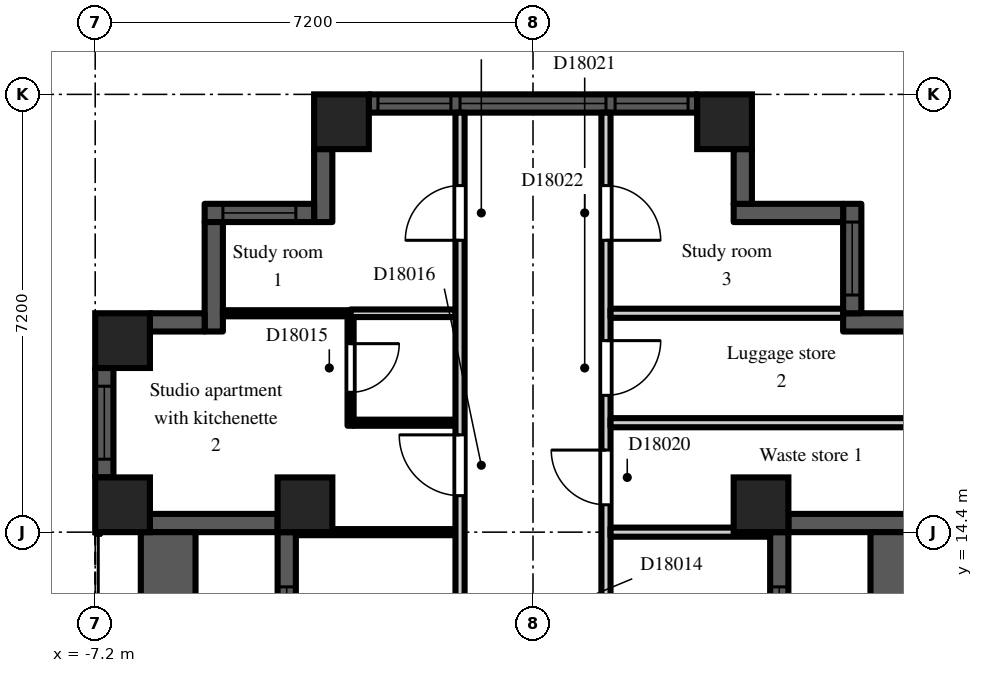
"""IFC4 building model, lengths in metres.
Left out: names, types, materials, properties, quantities, classifications, styles, units other than length and angle.
Written with IfcOpenShell. Run it as: python <this file> out.ifc"""

import sys

from ifc_helpers import new_model, si_unit, direction, frame, frame_2d, origin, origin_2d, place, context, subcontext, project, spatial, rectangle, extrude, element, fill, save


model = new_model("IFC4")
c1 = context("Model", 3, precision=1e-05, world=origin(), true_north=direction((0.0, 1.0)))
c2 = subcontext(c1, "Body", "Model", "MODEL_VIEW")
j1 = project(units=[si_unit("LENGTHUNIT", "METRE"), si_unit("PLANEANGLEUNIT", "RADIAN")], contexts=[c1])
p1 = place(None, origin())
s1 = spatial("IfcSite", under=j1, at=p1, CompositionType="ELEMENT")
p2 = place(p1, origin())
s2 = spatial("IfcBuilding", under=s1, at=p2, CompositionType="ELEMENT")
p3 = place(p2, frame((0.0, 0.0, 120.3)))
s3 = spatial("IfcBuildingStorey", under=s2, at=p3, CompositionType="ELEMENT", Elevation=120.3)
for number, where, z_axis, x_axis in (
    (1, (-6.75, 14.85, 0.0), (0.0, 0.0, 1.0), (1.0, 0.0, 0.0)),
    (2, (-6.75, 17.55, 0.0), (0.0, 0.0, 1.0), (1.0, 0.0, 0.0)),
    (3, (-3.75, 14.85, 0.0), (0.0, 0.0, 1.0), (1.0, 0.0, 0.0)),
    (4, (-3.15, 21.15, 0.0), (0.0, 0.0, 1.0), (1.0, 0.0, 0.0)),
    (5, (3.15, 21.15, 0.0), (0.0, 0.0, 1.0), (1.0, 0.0, 0.0)),
    (6, (3.75, 14.85, 0.0), (0.0, 0.0, 1.0), (1.0, 0.0, 0.0)),
):
    element("IfcColumn", number, at=place(p3, frame(where, z_axis=z_axis, x_axis=x_axis)), inside=s3, PredefinedType="COLUMN", context=c2, shape_type="SweptSolid", body=[
        extrude(rectangle(XDim=0.9, YDim=0.9, at=origin_2d()), origin(), (0.0, 0.0, 1.0), 3.0),
    ])
p4 = place(p3, frame((4.05, 7.2, 0.0), z_axis=(0.0, 0.0, 1.0), x_axis=(0.0, 1.0, 0.0)))
e7 = element("IfcWall", 7, at=p4, inside=s3, PredefinedType="SOLIDWALL", context=c2, shape_type="SweptSolid", body=[
    extrude(rectangle(XDim=7.2, YDim=0.3, at=frame_2d((3.6, 0.0))), origin(), (0.0, 0.0, 1.0), 2.2),
])
p5 = place(p4, frame((3.0, 0.0, 0.0)))
e8 = element("IfcOpeningElement", 8, at=p5, cuts=e7, PredefinedType="OPENING", context=c2, shape_type="SweptSolid", body=[
    extrude(rectangle(XDim=1.2, YDim=2.05, at=frame_2d((0.6, 1.025))), frame((0.0, 0.16, 0.0), z_axis=(0.0, -1.0, 0.0), x_axis=(1.0, 0.0, 0.0)), (0.0, 0.0, 1.0), 0.32),
])
p6 = place(p4, frame((0.9, 0.0, 0.2)))
e9 = element("IfcOpeningElement", 9, at=p6, cuts=e7, PredefinedType="OPENING", context=c2, shape_type="SweptSolid", body=[
    extrude(rectangle(XDim=1.8, YDim=1.85, at=frame_2d((0.9, 0.925))), frame((0.0, 0.16, 0.0), z_axis=(0.0, -1.0, 0.0), x_axis=(1.0, 0.0, 0.0)), (0.0, 0.0, 1.0), 0.32),
])
p7 = place(p4, frame((4.5, 0.0, 0.2)))
e10 = element("IfcOpeningElement", 10, at=p7, cuts=e7, PredefinedType="OPENING", context=c2, shape_type="SweptSolid", body=[
    extrude(rectangle(XDim=1.8, YDim=1.85, at=frame_2d((0.9, 0.925))), frame((0.0, 0.16, 0.0), z_axis=(0.0, -1.0, 0.0), x_axis=(1.0, 0.0, 0.0)), (0.0, 0.0, 1.0), 0.32),
])
p8 = place(p3, frame((4.2, 14.55, 0.0), z_axis=(0.0, 0.0, 1.0), x_axis=(1.0, 0.0, 0.0)))
e11 = element("IfcWall", 11, at=p8, inside=s3, PredefinedType="SOLIDWALL", context=c2, shape_type="SweptSolid", body=[
    extrude(rectangle(XDim=2.1, YDim=0.3, at=frame_2d((1.05, 0.0))), origin(), (0.0, 0.0, 1.0), 2.2),
])
p9 = place(p3, frame((6.3, 17.85, 0.0), z_axis=(0.0, 0.0, 1.0), x_axis=(-1.0, 0.0, 0.0)))
e12 = element("IfcWall", 12, at=p9, inside=s3, PredefinedType="SOLIDWALL", context=c2, shape_type="SweptSolid", body=[
    extrude(rectangle(XDim=1.2, YDim=0.3, at=frame_2d((0.6, 0.0))), origin(), (0.0, 0.0, 1.0), 2.6),
])
p10 = place(p3, frame((5.25, 18.0, 0.0), z_axis=(0.0, 0.0, 1.0), x_axis=(0.0, 1.0, 0.0)))
e13 = element("IfcWall", 13, at=p10, inside=s3, PredefinedType="SOLIDWALL", context=c2, shape_type="SweptSolid", body=[
    extrude(rectangle(XDim=1.8, YDim=0.3, at=frame_2d((0.9, 0.0))), origin(), (0.0, 0.0, 1.0), 2.6),
])
p11 = place(p10, frame((0.3, 0.0, 0.2)))
e14 = element("IfcOpeningElement", 14, at=p11, cuts=e13, PredefinedType="OPENING", context=c2, shape_type="SweptSolid", body=[
    extrude(rectangle(XDim=1.2, YDim=1.85, at=frame_2d((0.6, 0.925))), frame((0.0, 0.16, 0.0), z_axis=(0.0, -1.0, 0.0), x_axis=(1.0, 0.0, 0.0)), (0.0, 0.0, 1.0), 0.32),
])
p12 = place(p3, frame((5.1, 19.65, 0.0), z_axis=(0.0, 0.0, 1.0), x_axis=(-1.0, 0.0, 0.0)))
e15 = element("IfcWall", 15, at=p12, inside=s3, PredefinedType="SOLIDWALL", context=c2, shape_type="SweptSolid", body=[
    extrude(rectangle(XDim=1.8, YDim=0.3, at=frame_2d((0.9, 0.0))), origin(), (0.0, 0.0, 1.0), 2.6),
])
p13 = place(p3, frame((3.45, 19.8, 0.0), z_axis=(0.0, 0.0, 1.0), x_axis=(0.0, 1.0, 0.0)))
e16 = element("IfcWall", 16, at=p13, inside=s3, PredefinedType="SOLIDWALL", context=c2, shape_type="SweptSolid", body=[
    extrude(rectangle(XDim=0.9, YDim=0.3, at=frame_2d((0.45, 0.0))), origin(), (0.0, 0.0, 1.0), 2.6),
])
p14 = place(p3, frame((2.7, 21.45, 0.0), z_axis=(0.0, 0.0, 1.0), x_axis=(-1.0, 0.0, 0.0)))
e17 = element("IfcWall", 17, at=p14, inside=s3, PredefinedType="SOLIDWALL", context=c2, shape_type="SweptSolid", body=[
    extrude(rectangle(XDim=5.4, YDim=0.3, at=frame_2d((2.7, 0.0))), origin(), (0.0, 0.0, 1.0), 2.2),
])
p15 = place(p14, frame((1.5, 0.0, 0.2)))
e18 = element("IfcOpeningElement", 18, at=p15, cuts=e17, PredefinedType="OPENING", context=c2, shape_type="SweptSolid", body=[
    extrude(rectangle(XDim=2.4, YDim=1.85, at=frame_2d((1.2, 0.925))), frame((0.0, 0.16, 0.0), z_axis=(0.0, -1.0, 0.0), x_axis=(1.0, 0.0, 0.0)), (0.0, 0.0, 1.0), 0.32),
])
p16 = place(p14, frame((0.15, 0.0, 0.2)))
e19 = element("IfcOpeningElement", 19, at=p16, cuts=e17, PredefinedType="OPENING", context=c2, shape_type="SweptSolid", body=[
    extrude(rectangle(XDim=1.2, YDim=1.85, at=frame_2d((0.6, 0.925))), frame((0.0, 0.16, 0.0), z_axis=(0.0, -1.0, 0.0), x_axis=(1.0, 0.0, 0.0)), (0.0, 0.0, 1.0), 0.32),
])
p17 = place(p14, frame((4.05, 0.0, 0.2)))
e20 = element("IfcOpeningElement", 20, at=p17, cuts=e17, PredefinedType="OPENING", context=c2, shape_type="SweptSolid", body=[
    extrude(rectangle(XDim=1.2, YDim=1.85, at=frame_2d((0.6, 0.925))), frame((0.0, 0.16, 0.0), z_axis=(0.0, -1.0, 0.0), x_axis=(1.0, 0.0, 0.0)), (0.0, 0.0, 1.0), 0.32),
])
p18 = place(p3, frame((-3.45, 20.7, 0.0), z_axis=(0.0, 0.0, 1.0), x_axis=(0.0, -1.0, 0.0)))
e21 = element("IfcWall", 21, at=p18, inside=s3, PredefinedType="SOLIDWALL", context=c2, shape_type="SweptSolid", body=[
    extrude(rectangle(XDim=1.2, YDim=0.3, at=frame_2d((0.6, 0.0))), origin(), (0.0, 0.0, 1.0), 2.6),
])
p19 = place(p3, frame((-3.6, 19.65, 0.0), z_axis=(0.0, 0.0, 1.0), x_axis=(-1.0, 0.0, 0.0)))
e22 = element("IfcWall", 22, at=p19, inside=s3, PredefinedType="SOLIDWALL", context=c2, shape_type="SweptSolid", body=[
    extrude(rectangle(XDim=1.8, YDim=0.3, at=frame_2d((0.9, 0.0))), origin(), (0.0, 0.0, 1.0), 2.6),
])
p20 = place(p19, frame((0.3, 0.0, 0.2)))
e23 = element("IfcOpeningElement", 23, at=p20, cuts=e22, PredefinedType="OPENING", context=c2, shape_type="SweptSolid", body=[
    extrude(rectangle(XDim=1.2, YDim=1.85, at=frame_2d((0.6, 0.925))), frame((0.0, 0.16, 0.0), z_axis=(0.0, -1.0, 0.0), x_axis=(1.0, 0.0, 0.0)), (0.0, 0.0, 1.0), 0.32),
])
p21 = place(p3, frame((-5.25, 19.5, 0.0), z_axis=(0.0, 0.0, 1.0), x_axis=(0.0, -1.0, 0.0)))
e24 = element("IfcWall", 24, at=p21, inside=s3, PredefinedType="SOLIDWALL", context=c2, shape_type="SweptSolid", body=[
    extrude(rectangle(XDim=1.8, YDim=0.3, at=frame_2d((0.9, 0.0))), origin(), (0.0, 0.0, 1.0), 2.6),
])
p22 = place(p3, frame((-5.4, 17.85, 0.0), z_axis=(0.0, 0.0, 1.0), x_axis=(-1.0, 0.0, 0.0)))
e25 = element("IfcWall", 25, at=p22, inside=s3, PredefinedType="SOLIDWALL", context=c2, shape_type="SweptSolid", body=[
    extrude(rectangle(XDim=0.9, YDim=0.3, at=frame_2d((0.45, 0.0))), origin(), (0.0, 0.0, 1.0), 2.6),
])
p23 = place(p3, frame((-7.05, 17.1, 0.0), z_axis=(0.0, 0.0, 1.0), x_axis=(0.0, -1.0, 0.0)))
e26 = element("IfcWall", 26, at=p23, inside=s3, PredefinedType="SOLIDWALL", context=c2, shape_type="SweptSolid", body=[
    extrude(rectangle(XDim=1.8, YDim=0.3, at=frame_2d((0.9, 0.0))), origin(), (0.0, 0.0, 1.0), 2.2),
])
p24 = place(p23, frame((0.3, 0.0, 0.2)))
e27 = element("IfcOpeningElement", 27, at=p24, cuts=e26, PredefinedType="OPENING", context=c2, shape_type="SweptSolid", body=[
    extrude(rectangle(XDim=1.2, YDim=1.85, at=frame_2d((0.6, 0.925))), frame((0.0, 0.16, 0.0), z_axis=(0.0, -1.0, 0.0), x_axis=(1.0, 0.0, 0.0)), (0.0, 0.0, 1.0), 0.32),
])
p25 = place(p3, frame((-6.3, 14.55, 0.0), z_axis=(0.0, 0.0, 1.0), x_axis=(1.0, 0.0, 0.0)))
e28 = element("IfcWall", 28, at=p25, inside=s3, PredefinedType="SOLIDWALL", context=c2, shape_type="SweptSolid", body=[
    extrude(rectangle(XDim=2.1, YDim=0.3, at=frame_2d((1.05, 0.0))), origin(), (0.0, 0.0, 1.0), 2.2),
])
p26 = place(p3, frame((-4.05, 14.4, 0.0), z_axis=(0.0, 0.0, 1.0), x_axis=(0.0, -1.0, 0.0)))
e29 = element("IfcWall", 29, at=p26, inside=s3, PredefinedType="SOLIDWALL", context=c2, shape_type="SweptSolid", body=[
    extrude(rectangle(XDim=7.2, YDim=0.3, at=frame_2d((3.6, 0.0))), origin(), (0.0, 0.0, 1.0), 2.2),
])
p27 = place(p26, frame((3.0, 0.0, 0.0)))
e30 = element("IfcOpeningElement", 30, at=p27, cuts=e29, PredefinedType="OPENING", context=c2, shape_type="SweptSolid", body=[
    extrude(rectangle(XDim=1.2, YDim=2.05, at=frame_2d((0.6, 1.025))), frame((0.0, 0.16, 0.0), z_axis=(0.0, -1.0, 0.0), x_axis=(1.0, 0.0, 0.0)), (0.0, 0.0, 1.0), 0.32),
])
p28 = place(p26, frame((0.9, 0.0, 0.2)))
e31 = element("IfcOpeningElement", 31, at=p28, cuts=e29, PredefinedType="OPENING", context=c2, shape_type="SweptSolid", body=[
    extrude(rectangle(XDim=1.8, YDim=1.85, at=frame_2d((0.9, 0.925))), frame((0.0, 0.16, 0.0), z_axis=(0.0, -1.0, 0.0), x_axis=(1.0, 0.0, 0.0)), (0.0, 0.0, 1.0), 0.32),
])
p29 = place(p26, frame((4.5, 0.0, 0.2)))
e32 = element("IfcOpeningElement", 32, at=p29, cuts=e29, PredefinedType="OPENING", context=c2, shape_type="SweptSolid", body=[
    extrude(rectangle(XDim=1.8, YDim=1.85, at=frame_2d((0.9, 0.925))), frame((0.0, 0.16, 0.0), z_axis=(0.0, -1.0, 0.0), x_axis=(1.0, 0.0, 0.0)), (0.0, 0.0, 1.0), 0.32),
])
for number, where, z_axis, x_axis in (
    (33, (6.0, 7.2, 0.0), (0.0, 0.0, 1.0), (0.0, 1.0, 0.0)),
    (34, (-6.0, 7.2, 0.0), (0.0, 0.0, 1.0), (0.0, 1.0, 0.0)),
):
    element("IfcWall", number, at=place(p3, frame(where, z_axis=z_axis, x_axis=x_axis)), inside=s3, PredefinedType="PARAPET", context=c2, shape_type="SweptSolid", body=[
        extrude(rectangle(XDim=7.2, YDim=0.9, at=frame_2d((3.6, 0.0))), origin(), (0.0, 0.0, 1.0), 0.8),
    ])
p30 = place(p3, frame((-5.1, 18.0, 0.0), z_axis=(0.0, 0.0, 1.0), x_axis=(1.0, 0.0, 0.0)))
e35 = element("IfcWall", 35, at=p30, inside=s3, PredefinedType="PARTITIONING", context=c2, shape_type="SweptSolid", body=[
    extrude(rectangle(XDim=2.1, YDim=0.1, at=frame_2d((1.05, 0.0))), origin(), (0.0, 0.0, 1.0), 2.6),
])
p31 = place(p3, frame((-3.9, 14.4, 0.0), z_axis=(0.0, 0.0, 1.0), x_axis=(1.0, 0.0, 0.0)))
e36 = element("IfcWall", 36, at=p31, inside=s3, PredefinedType="PARTITIONING", context=c2, shape_type="SweptSolid", body=[
    extrude(rectangle(XDim=2.625, YDim=0.1, at=frame_2d((1.312, 0.0))), origin(), (0.0, 0.0, 1.0), 2.6),
])
p32 = place(p3, frame((-3.0, 16.15, 0.0), z_axis=(0.0, 0.0, 1.0), x_axis=(0.0, 1.0, 0.0)))
e37 = element("IfcWall", 37, at=p32, inside=s3, PredefinedType="PARTITIONING", context=c2, shape_type="SweptSolid", body=[
    extrude(rectangle(XDim=1.788, YDim=0.1, at=frame_2d((0.894, 0.0))), origin(), (0.0, 0.0, 1.0), 2.6),
])
p33 = place(p32, frame((0.55, 0.0, 0.0)))
e38 = element("IfcOpeningElement", 38, at=p33, cuts=e37, PredefinedType="OPENING", context=c2, shape_type="SweptSolid", body=[
    extrude(rectangle(XDim=0.8, YDim=2.1, at=frame_2d((0.4, 1.05))), frame((0.0, 0.06, 0.0), z_axis=(0.0, -1.0, 0.0), x_axis=(1.0, 0.0, 0.0)), (0.0, 0.0, 1.0), 0.12),
])
p34 = place(p3, frame((-2.95, 16.2, 0.0), z_axis=(0.0, 0.0, 1.0), x_axis=(1.0, 0.0, 0.0)))
e39 = element("IfcWall", 39, at=p34, inside=s3, PredefinedType="PARTITIONING", context=c2, shape_type="SweptSolid", body=[
    extrude(rectangle(XDim=1.675, YDim=0.1, at=frame_2d((0.837, 0.0))), origin(), (0.0, 0.0, 1.0), 2.6),
])
p35 = place(p3, frame((-3.0, 18.0, 0.0), z_axis=(0.0, 0.0, 1.0), x_axis=(1.0, 0.0, 0.0)))
e40 = element("IfcWall", 40, at=p35, inside=s3, PredefinedType="PARTITIONING", context=c2, shape_type="SweptSolid", body=[
    extrude(rectangle(XDim=1.725, YDim=0.125, at=frame_2d((0.863, 0.0))), origin(), (0.0, 0.0, 1.0), 2.6),
])
p36 = place(p3, frame((-1.2, 7.275, 0.0), z_axis=(0.0, 0.0, 1.0), x_axis=(0.0, 1.0, 0.0)))
e41 = element("IfcWall", 41, at=p36, inside=s3, PredefinedType="PARTITIONING", context=c2, shape_type="SweptSolid", body=[
    extrude(rectangle(XDim=14.025, YDim=0.15, at=frame_2d((7.013, 0.0))), origin(), (0.0, 0.0, 1.0), 2.6),
])
p37 = place(p36, frame((4.875, 0.0, 0.0)))
e42 = element("IfcOpeningElement", 42, at=p37, cuts=e41, PredefinedType="OPENING", context=c2, shape_type="SweptSolid", body=[
    extrude(rectangle(XDim=0.9, YDim=2.1, at=frame_2d((0.45, 1.05))), frame((0.0, 0.085, 0.0), z_axis=(0.0, -1.0, 0.0), x_axis=(1.0, 0.0, 0.0)), (0.0, 0.0, 1.0), 0.17),
])
p38 = place(p36, frame((7.725, 0.0, 0.0)))
e43 = element("IfcOpeningElement", 43, at=p38, cuts=e41, PredefinedType="OPENING", context=c2, shape_type="SweptSolid", body=[
    extrude(rectangle(XDim=1.0, YDim=2.1, at=frame_2d((0.5, 1.05))), frame((0.0, 0.085, 0.0), z_axis=(0.0, -1.0, 0.0), x_axis=(1.0, 0.0, 0.0)), (0.0, 0.0, 1.0), 0.17),
])
p39 = place(p36, frame((11.925, 0.0, 0.0)))
e44 = element("IfcOpeningElement", 44, at=p39, cuts=e41, PredefinedType="OPENING", context=c2, shape_type="SweptSolid", body=[
    extrude(rectangle(XDim=0.9, YDim=2.1, at=frame_2d((0.45, 1.05))), frame((0.0, 0.085, 0.0), z_axis=(0.0, -1.0, 0.0), x_axis=(1.0, 0.0, 0.0)), (0.0, 0.0, 1.0), 0.17),
])
p40 = place(p3, frame((1.2, 7.125, 0.0), z_axis=(0.0, 0.0, 1.0), x_axis=(0.0, 1.0, 0.0)))
e45 = element("IfcWall", 45, at=p40, inside=s3, PredefinedType="PARTITIONING", context=c2, shape_type="SweptSolid", body=[
    extrude(rectangle(XDim=14.175, YDim=0.15, at=frame_2d((7.087, 0.0))), origin(), (0.0, 0.0, 1.0), 2.6),
])
p41 = place(p40, frame((1.025, 0.0, 0.0)))
e46 = element("IfcOpeningElement", 46, at=p41, cuts=e45, PredefinedType="OPENING", context=c2, shape_type="SweptSolid", body=[
    extrude(rectangle(XDim=0.9, YDim=2.1, at=frame_2d((0.45, 1.05))), frame((0.0, 0.085, 0.0), z_axis=(0.0, -1.0, 0.0), x_axis=(1.0, 0.0, 0.0)), (0.0, 0.0, 1.0), 0.17),
])
p42 = place(p40, frame((4.625, 0.0, 0.0)))
e47 = element("IfcOpeningElement", 47, at=p42, cuts=e45, PredefinedType="OPENING", context=c2, shape_type="SweptSolid", body=[
    extrude(rectangle(XDim=0.9, YDim=2.1, at=frame_2d((0.45, 1.05))), frame((0.0, 0.085, 0.0), z_axis=(0.0, -1.0, 0.0), x_axis=(1.0, 0.0, 0.0)), (0.0, 0.0, 1.0), 0.17),
])
p43 = place(p40, frame((7.725, 0.0, 0.0)))
e48 = element("IfcOpeningElement", 48, at=p43, cuts=e45, PredefinedType="OPENING", context=c2, shape_type="SweptSolid", body=[
    extrude(rectangle(XDim=0.9, YDim=2.1, at=frame_2d((0.45, 1.05))), frame((0.0, 0.085, 0.0), z_axis=(0.0, -1.0, 0.0), x_axis=(1.0, 0.0, 0.0)), (0.0, 0.0, 1.0), 0.17),
])
p44 = place(p40, frame((9.525, 0.0, 0.0)))
e49 = element("IfcOpeningElement", 49, at=p44, cuts=e45, PredefinedType="OPENING", context=c2, shape_type="SweptSolid", body=[
    extrude(rectangle(XDim=0.9, YDim=2.1, at=frame_2d((0.45, 1.05))), frame((0.0, 0.085, 0.0), z_axis=(0.0, -1.0, 0.0), x_axis=(1.0, 0.0, 0.0)), (0.0, 0.0, 1.0), 0.17),
])
p45 = place(p40, frame((12.075, 0.0, 0.0)))
e50 = element("IfcOpeningElement", 50, at=p45, cuts=e45, PredefinedType="OPENING", context=c2, shape_type="SweptSolid", body=[
    extrude(rectangle(XDim=0.9, YDim=2.1, at=frame_2d((0.45, 1.05))), frame((0.0, 0.085, 0.0), z_axis=(0.0, -1.0, 0.0), x_axis=(1.0, 0.0, 0.0)), (0.0, 0.0, 1.0), 0.17),
])
p46 = place(p3, frame((1.275, 14.4, 0.0), z_axis=(0.0, 0.0, 1.0), x_axis=(1.0, 0.0, 0.0)))
e51 = element("IfcWall", 51, at=p46, inside=s3, PredefinedType="PARTITIONING", context=c2, shape_type="SweptSolid", body=[
    extrude(rectangle(XDim=2.625, YDim=0.15, at=frame_2d((1.312, 0.0))), origin(), (0.0, 0.0, 1.0), 2.6),
])
p47 = place(p3, frame((1.275, 16.2, 0.0), z_axis=(0.0, 0.0, 1.0), x_axis=(1.0, 0.0, 0.0)))
e52 = element("IfcWall", 52, at=p47, inside=s3, PredefinedType="PARTITIONING", context=c2, shape_type="SweptSolid", body=[
    extrude(rectangle(XDim=5.625, YDim=0.15, at=frame_2d((2.812, 0.0))), origin(), (0.0, 0.0, 1.0), 2.6),
])
p48 = place(p3, frame((1.275, 18.0, 0.0), z_axis=(0.0, 0.0, 1.0), x_axis=(1.0, 0.0, 0.0)))
e53 = element("IfcWall", 53, at=p48, inside=s3, PredefinedType="PARTITIONING", context=c2, shape_type="SweptSolid", body=[
    extrude(rectangle(XDim=3.825, YDim=0.15, at=frame_2d((1.913, 0.0))), origin(), (0.0, 0.0, 1.0), 2.6),
])
p49 = place(p7, origin())
e54 = element("IfcWindow", 54, at=p49, inside=s3, PartitioningType="SINGLE_PANEL", PredefinedType="WINDOW", context=c2, shape_type="SweptSolid", body=[
    extrude(rectangle(XDim=1.8, YDim=1.85, at=frame_2d((0.9, 0.925))), frame((0.0, 0.03, 0.0), z_axis=(0.0, -1.0, 0.0), x_axis=(1.0, 0.0, 0.0)), (0.0, 0.0, 1.0), 0.06),
])
fill(e10, e54)
p50 = place(p11, origin())
e55 = element("IfcWindow", 55, at=p50, inside=s3, PartitioningType="SINGLE_PANEL", PredefinedType="WINDOW", context=c2, shape_type="SweptSolid", body=[
    extrude(rectangle(XDim=1.2, YDim=1.85, at=frame_2d((0.6, 0.925))), frame((0.0, 0.03, 0.0), z_axis=(0.0, -1.0, 0.0), x_axis=(1.0, 0.0, 0.0)), (0.0, 0.0, 1.0), 0.06),
])
fill(e14, e55)
p51 = place(p15, origin())
e56 = element("IfcWindow", 56, at=p51, inside=s3, PartitioningType="SINGLE_PANEL", PredefinedType="WINDOW", context=c2, shape_type="SweptSolid", body=[
    extrude(rectangle(XDim=2.4, YDim=1.85, at=frame_2d((1.2, 0.925))), frame((0.0, 0.03, 0.0), z_axis=(0.0, -1.0, 0.0), x_axis=(1.0, 0.0, 0.0)), (0.0, 0.0, 1.0), 0.06),
])
fill(e18, e56)
p52 = place(p16, origin())
e57 = element("IfcWindow", 57, at=p52, inside=s3, PartitioningType="SINGLE_PANEL", PredefinedType="WINDOW", context=c2, shape_type="SweptSolid", body=[
    extrude(rectangle(XDim=1.2, YDim=1.85, at=frame_2d((0.6, 0.925))), frame((0.0, 0.03, 0.0), z_axis=(0.0, -1.0, 0.0), x_axis=(1.0, 0.0, 0.0)), (0.0, 0.0, 1.0), 0.06),
])
fill(e19, e57)
p53 = place(p17, origin())
e58 = element("IfcWindow", 58, at=p53, inside=s3, PartitioningType="SINGLE_PANEL", PredefinedType="WINDOW", context=c2, shape_type="SweptSolid", body=[
    extrude(rectangle(XDim=1.2, YDim=1.85, at=frame_2d((0.6, 0.925))), frame((0.0, 0.03, 0.0), z_axis=(0.0, -1.0, 0.0), x_axis=(1.0, 0.0, 0.0)), (0.0, 0.0, 1.0), 0.06),
])
fill(e20, e58)
p54 = place(p20, origin())
e59 = element("IfcWindow", 59, at=p54, inside=s3, PartitioningType="SINGLE_PANEL", PredefinedType="WINDOW", context=c2, shape_type="SweptSolid", body=[
    extrude(rectangle(XDim=1.2, YDim=1.85, at=frame_2d((0.6, 0.925))), frame((0.0, 0.03, 0.0), z_axis=(0.0, -1.0, 0.0), x_axis=(1.0, 0.0, 0.0)), (0.0, 0.0, 1.0), 0.06),
])
fill(e23, e59)
p55 = place(p24, origin())
e60 = element("IfcWindow", 60, at=p55, inside=s3, PartitioningType="SINGLE_PANEL", PredefinedType="WINDOW", context=c2, shape_type="SweptSolid", body=[
    extrude(rectangle(XDim=1.2, YDim=1.85, at=frame_2d((0.6, 0.925))), frame((0.0, 0.03, 0.0), z_axis=(0.0, -1.0, 0.0), x_axis=(1.0, 0.0, 0.0)), (0.0, 0.0, 1.0), 0.06),
])
fill(e27, e60)
p56 = place(p28, origin())
e61 = element("IfcWindow", 61, at=p56, inside=s3, PartitioningType="SINGLE_PANEL", PredefinedType="WINDOW", context=c2, shape_type="SweptSolid", body=[
    extrude(rectangle(XDim=1.8, YDim=1.85, at=frame_2d((0.9, 0.925))), frame((0.0, 0.03, 0.0), z_axis=(0.0, -1.0, 0.0), x_axis=(1.0, 0.0, 0.0)), (0.0, 0.0, 1.0), 0.06),
])
fill(e31, e61)
p57 = place(p33, frame((0.8, 0.0, 0.0), z_axis=(0.0, 0.0, 1.0), x_axis=(-1.0, 0.0, 0.0)))
e62 = element("IfcDoor", 62, at=p57, inside=s3, OperationType="SINGLE_SWING_LEFT", PredefinedType="DOOR", context=c2, shape_type="SweptSolid", body=[
    extrude(rectangle(XDim=0.8, YDim=2.1, at=frame_2d((0.4, 1.05))), frame((0.0, 0.025, 0.0), z_axis=(0.0, -1.0, 0.0), x_axis=(1.0, 0.0, 0.0)), (0.0, 0.0, 1.0), 0.05),
])
fill(e38, e62)
p58 = place(p38, origin())
e63 = element("IfcDoor", 63, at=p58, inside=s3, OperationType="SINGLE_SWING_RIGHT", PredefinedType="DOOR", context=c2, shape_type="SweptSolid", body=[
    extrude(rectangle(XDim=1.0, YDim=2.1, at=frame_2d((0.5, 1.05))), frame((0.0, 0.025, 0.0), z_axis=(0.0, -1.0, 0.0), x_axis=(1.0, 0.0, 0.0)), (0.0, 0.0, 1.0), 0.05),
])
fill(e43, e63)
p59 = place(p39, origin())
e64 = element("IfcDoor", 64, at=p59, inside=s3, OperationType="SINGLE_SWING_LEFT", PredefinedType="DOOR", context=c2, shape_type="SweptSolid", body=[
    extrude(rectangle(XDim=0.9, YDim=2.1, at=frame_2d((0.45, 1.05))), frame((0.0, 0.025, 0.0), z_axis=(0.0, -1.0, 0.0), x_axis=(1.0, 0.0, 0.0)), (0.0, 0.0, 1.0), 0.05),
])
fill(e44, e64)
p60 = place(p43, origin())
e65 = element("IfcDoor", 65, at=p60, inside=s3, OperationType="SINGLE_SWING_RIGHT", PredefinedType="DOOR", context=c2, shape_type="SweptSolid", body=[
    extrude(rectangle(XDim=0.9, YDim=2.1, at=frame_2d((0.45, 1.05))), frame((0.0, 0.025, 0.0), z_axis=(0.0, -1.0, 0.0), x_axis=(1.0, 0.0, 0.0)), (0.0, 0.0, 1.0), 0.05),
])
fill(e48, e65)
p61 = place(p44, frame((0.9, 0.0, 0.0), z_axis=(0.0, 0.0, 1.0), x_axis=(-1.0, 0.0, 0.0)))
e66 = element("IfcDoor", 66, at=p61, inside=s3, OperationType="SINGLE_SWING_LEFT", PredefinedType="DOOR", context=c2, shape_type="SweptSolid", body=[
    extrude(rectangle(XDim=0.9, YDim=2.1, at=frame_2d((0.45, 1.05))), frame((0.0, 0.025, 0.0), z_axis=(0.0, -1.0, 0.0), x_axis=(1.0, 0.0, 0.0)), (0.0, 0.0, 1.0), 0.05),
])
fill(e49, e66)
p62 = place(p45, frame((0.9, 0.0, 0.0), z_axis=(0.0, 0.0, 1.0), x_axis=(-1.0, 0.0, 0.0)))
e67 = element("IfcDoor", 67, at=p62, inside=s3, OperationType="SINGLE_SWING_RIGHT", PredefinedType="DOOR", context=c2, shape_type="SweptSolid", body=[
    extrude(rectangle(XDim=0.9, YDim=2.1, at=frame_2d((0.45, 1.05))), frame((0.0, 0.025, 0.0), z_axis=(0.0, -1.0, 0.0), x_axis=(1.0, 0.0, 0.0)), (0.0, 0.0, 1.0), 0.05),
])
fill(e50, e67)
save(model, sys.argv[1])
